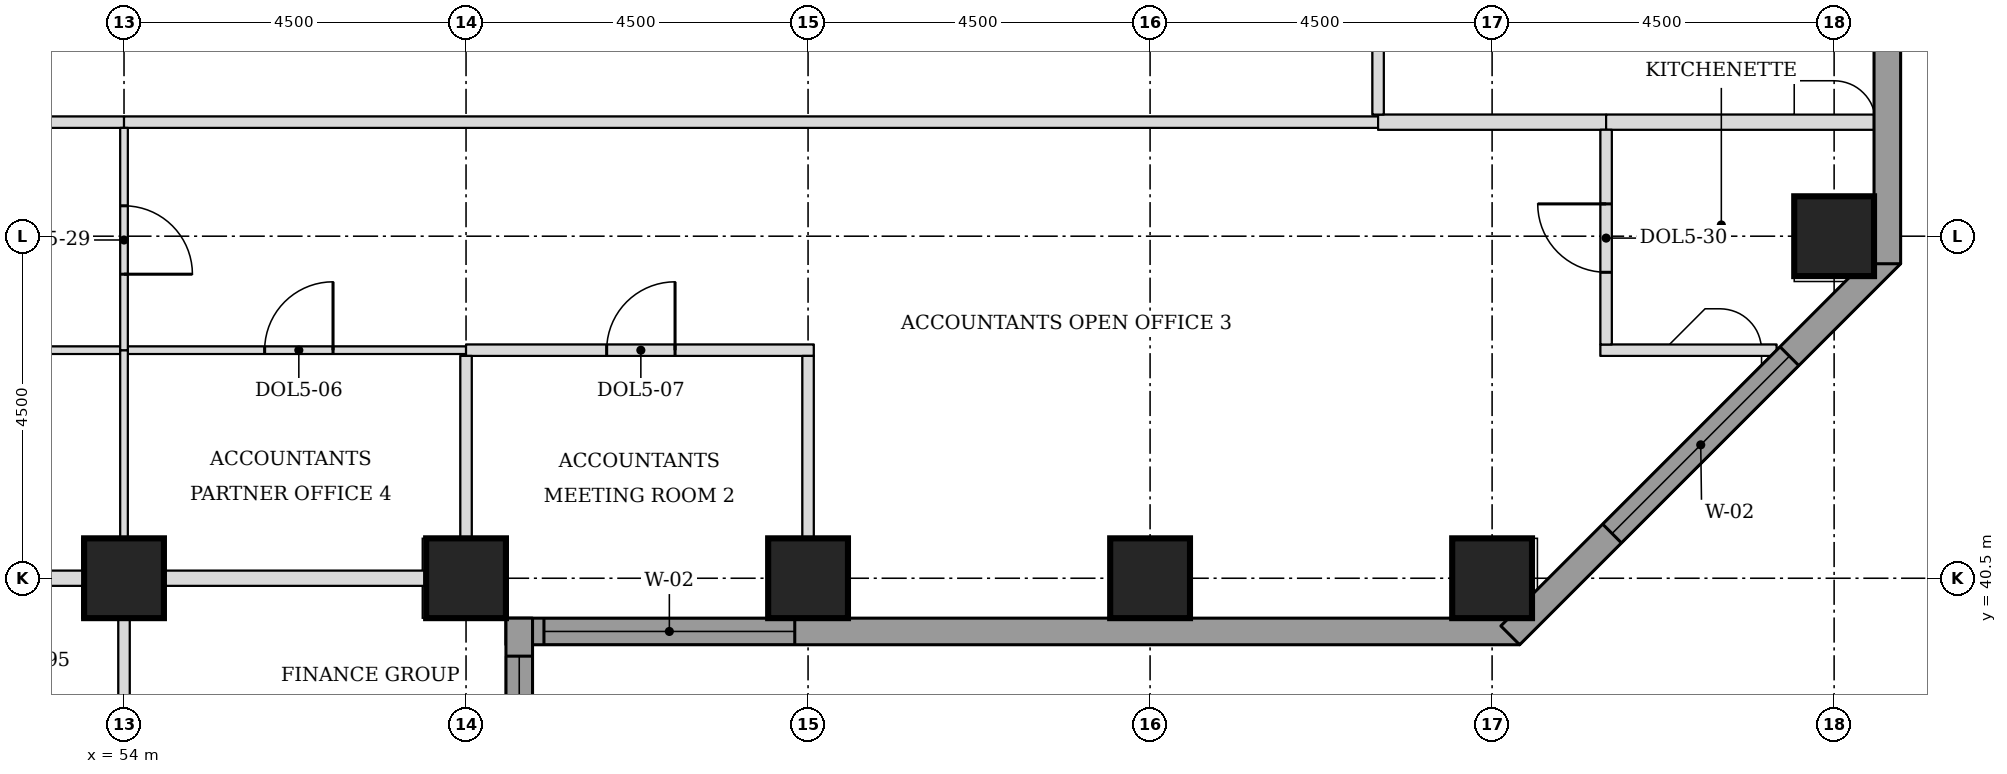
"""IFC4 building model, lengths in metres.
Left out: names, types, materials, properties, quantities, classifications, styles, units other than length and angle.
Written with IfcOpenShell. Run it as: python <this file> out.ifc"""

import sys

from ifc_helpers import new_model, si_unit, direction, frame, frame_2d, origin, origin_2d, place, context, subcontext, project, spatial, rectangle, extrude, element, fill, save


model = new_model("IFC4")
c1 = context("Model", 3, precision=1e-05, world=origin(), true_north=direction((0.0, 1.0)))
c2 = subcontext(c1, "Body", "Model", "MODEL_VIEW")
j1 = project(units=[si_unit("LENGTHUNIT", "METRE"), si_unit("PLANEANGLEUNIT", "RADIAN")], contexts=[c1])
p1 = place(None, origin())
s1 = spatial("IfcSite", under=j1, at=p1, CompositionType="ELEMENT")
p2 = place(p1, origin())
s2 = spatial("IfcBuilding", under=s1, at=p2, CompositionType="ELEMENT")
p3 = place(p2, frame((0.0, 0.0, 112.2)))
s3 = spatial("IfcBuildingStorey", under=s2, at=p3, CompositionType="ELEMENT", Elevation=112.2)
for number, where, z_axis, x_axis in (
    (1, (54.0, 40.5, 0.0), (0.0, 0.0, 1.0), (1.0, 0.0, 0.0)),
    (2, (58.5, 40.5, 0.0), (0.0, 0.0, 1.0), (1.0, 0.0, 0.0)),
    (3, (63.0, 40.5, 0.0), (0.0, 0.0, 1.0), (1.0, 0.0, 0.0)),
    (4, (67.5, 40.5, 0.0), (0.0, 0.0, 1.0), (1.0, 0.0, 0.0)),
    (5, (72.0, 40.5, 0.0), (0.0, 0.0, 1.0), (1.0, 0.0, 0.0)),
    (6, (76.5, 45.0, 0.0), (0.0, 0.0, 1.0), (1.0, 0.0, 0.0)),
):
    element("IfcColumn", number, at=place(p3, frame(where, z_axis=z_axis, x_axis=x_axis)), inside=s3, PredefinedType="COLUMN", context=c2, shape_type="SweptSolid", body=[
        extrude(rectangle(XDim=1.05, YDim=1.05, at=origin_2d()), origin(), (0.0, 0.0, 1.0), 3.7),
    ])
p4 = place(p3, frame((59.025, 39.8, 0.0), z_axis=(0.0, 0.0, 1.0), x_axis=(1.0, 0.0, 0.0)))
e7 = element("IfcWall", 7, at=p4, inside=s3, PredefinedType="STANDARD", context=c2, shape_type="SweptSolid", body=[
    extrude(rectangle(XDim=13.337, YDim=0.35, at=frame_2d((6.669, 0.0))), origin(), (0.0, 0.0, 1.0), 3.525),
])
p5 = place(p4, frame((0.5, 0.0, 0.9)))
e8 = element("IfcOpeningElement", 8, at=p5, cuts=e7, PredefinedType="OPENING", context=c2, shape_type="SweptSolid", body=[
    extrude(rectangle(XDim=3.3, YDim=1.9, at=frame_2d((1.65, 0.95))), frame((0.0, 0.185, 0.0), z_axis=(0.0, -1.0, 0.0), x_axis=(1.0, 0.0, 0.0)), (0.0, 0.0, 1.0), 0.37),
])
p6 = place(p3, frame((72.239, 39.749, 0.0), z_axis=(0.0, 0.0, 1.0), x_axis=(0.707106781187, 0.707106781187, 0.0)))
e9 = element("IfcWall", 9, at=p6, inside=s3, PredefinedType="STANDARD", context=c2, shape_type="SweptSolid", body=[
    extrude(rectangle(XDim=7.089, YDim=0.35, at=frame_2d((3.544, 0.0))), origin(), (0.0, 0.0, 1.0), 3.525),
])
p7 = place(p6, frame((1.894, 0.0, 0.9)))
e10 = element("IfcOpeningElement", 10, at=p7, cuts=e9, PredefinedType="OPENING", context=c2, shape_type="SweptSolid", body=[
    extrude(rectangle(XDim=3.3, YDim=1.9, at=frame_2d((1.65, 0.95))), frame((0.0, 0.185, 0.0), z_axis=(0.0, -1.0, 0.0), x_axis=(1.0, 0.0, 0.0)), (0.0, 0.0, 1.0), 0.37),
])
p8 = place(p3, frame((77.2, 44.638, 0.0), z_axis=(0.0, 0.0, 1.0), x_axis=(0.0, 1.0, 0.0)))
e11 = element("IfcWall", 11, at=p8, inside=s3, PredefinedType="STANDARD", context=c2, shape_type="SweptSolid", body=[
    extrude(rectangle(XDim=32.225, YDim=0.35, at=frame_2d((16.112, 0.0))), origin(), (0.0, 0.0, 1.0), 3.525),
])
p9 = place(p8, frame((5.462, 0.0, 0.9)))
e12 = element("IfcOpeningElement", 12, at=p9, cuts=e11, PredefinedType="OPENING", context=c2, shape_type="SweptSolid", body=[
    extrude(rectangle(XDim=3.3, YDim=1.9, at=frame_2d((1.65, 0.95))), frame((0.0, 0.185, 0.0), z_axis=(0.0, -1.0, 0.0), x_axis=(1.0, 0.0, 0.0)), (0.0, 0.0, 1.0), 0.37),
])
p10 = place(p8, frame((9.962, 0.0, 0.9)))
e13 = element("IfcOpeningElement", 13, at=p10, cuts=e11, PredefinedType="OPENING", context=c2, shape_type="SweptSolid", body=[
    extrude(rectangle(XDim=3.3, YDim=1.9, at=frame_2d((1.65, 0.95))), frame((0.0, 0.185, 0.0), z_axis=(0.0, -1.0, 0.0), x_axis=(1.0, 0.0, 0.0)), (0.0, 0.0, 1.0), 0.37),
])
p11 = place(p8, frame((14.462, 0.0, 0.9)))
e14 = element("IfcOpeningElement", 14, at=p11, cuts=e11, PredefinedType="OPENING", context=c2, shape_type="SweptSolid", body=[
    extrude(rectangle(XDim=3.3, YDim=1.9, at=frame_2d((1.65, 0.95))), frame((0.0, 0.185, 0.0), z_axis=(0.0, -1.0, 0.0), x_axis=(1.0, 0.0, 0.0)), (0.0, 0.0, 1.0), 0.37),
])
p12 = place(p8, frame((18.962, 0.0, 0.9)))
e15 = element("IfcOpeningElement", 15, at=p12, cuts=e11, PredefinedType="OPENING", context=c2, shape_type="SweptSolid", body=[
    extrude(rectangle(XDim=3.3, YDim=1.9, at=frame_2d((1.65, 0.95))), frame((0.0, 0.185, 0.0), z_axis=(0.0, -1.0, 0.0), x_axis=(1.0, 0.0, 0.0)), (0.0, 0.0, 1.0), 0.37),
])
p13 = place(p8, frame((23.462, 0.0, 0.9)))
e16 = element("IfcOpeningElement", 16, at=p13, cuts=e11, PredefinedType="OPENING", context=c2, shape_type="SweptSolid", body=[
    extrude(rectangle(XDim=3.3, YDim=1.9, at=frame_2d((1.65, 0.95))), frame((0.0, 0.185, 0.0), z_axis=(0.0, -1.0, 0.0), x_axis=(1.0, 0.0, 0.0)), (0.0, 0.0, 1.0), 0.37),
])
p14 = place(p3, frame((59.2, 22.138, 0.0), z_axis=(0.0, 0.0, 1.0), x_axis=(0.0, 1.0, 0.0)))
e17 = element("IfcWall", 17, at=p14, inside=s3, PredefinedType="STANDARD", context=c2, shape_type="SweptSolid", body=[
    extrude(rectangle(XDim=17.837, YDim=0.35, at=frame_2d((8.919, 0.0))), origin(), (0.0, 0.0, 1.0), 3.525),
])
p15 = place(p14, frame((5.462, 0.0, 0.9)))
e18 = element("IfcOpeningElement", 18, at=p15, cuts=e17, PredefinedType="OPENING", context=c2, shape_type="SweptSolid", body=[
    extrude(rectangle(XDim=3.3, YDim=1.9, at=frame_2d((1.65, 0.95))), frame((0.0, 0.185, 0.0), z_axis=(0.0, -1.0, 0.0), x_axis=(1.0, 0.0, 0.0)), (0.0, 0.0, 1.0), 0.37),
])
p16 = place(p14, frame((14.037, 0.0, 0.9)))
e19 = element("IfcOpeningElement", 19, at=p16, cuts=e17, PredefinedType="OPENING", context=c2, shape_type="SweptSolid", body=[
    extrude(rectangle(XDim=3.3, YDim=1.9, at=frame_2d((1.65, 0.95))), frame((0.0, 0.185, 0.0), z_axis=(0.0, -1.0, 0.0), x_axis=(1.0, 0.0, 0.0)), (0.0, 0.0, 1.0), 0.37),
])
p17 = place(p3, frame((50.015, 40.5, 0.0), z_axis=(0.0, 0.0, 1.0), x_axis=(1.0, 0.0, 0.0)))
e20 = element("IfcWall", 20, at=p17, inside=s3, PredefinedType="PARTITIONING", context=c2, shape_type="SweptSolid", body=[
    extrude(rectangle(XDim=3.46, YDim=0.2, at=frame_2d((1.73, 0.0))), origin(), (0.0, 0.0, 1.0), 2.8),
])
p18 = place(p3, frame((54.495, 40.5, 0.0), z_axis=(0.0, 0.0, 1.0), x_axis=(1.0, 0.0, 0.0)))
e21 = element("IfcWall", 21, at=p18, inside=s3, PredefinedType="PARTITIONING", context=c2, shape_type="SweptSolid", body=[
    extrude(rectangle(XDim=3.48, YDim=0.2, at=frame_2d((1.74, 0.0))), origin(), (0.0, 0.0, 1.0), 2.8),
])
p19 = place(p3, frame((49.575, 43.5, 0.0), z_axis=(0.0, 0.0, 1.0), x_axis=(1.0, 0.0, 0.0)))
e22 = element("IfcWall", 22, at=p19, inside=s3, PredefinedType="PARTITIONING", context=c2, shape_type="SweptSolid", body=[
    extrude(rectangle(XDim=4.375, YDim=0.1, at=frame_2d((2.188, 0.0))), origin(), (0.0, 0.0, 1.0), 3.55),
])
p20 = place(p19, frame((1.75, 0.0, 0.0)))
e23 = element("IfcOpeningElement", 23, at=p20, cuts=e22, PredefinedType="OPENING", context=c2, shape_type="SweptSolid", body=[
    extrude(rectangle(XDim=0.9, YDim=2.1, at=frame_2d((0.45, 1.05))), frame((0.0, 0.06, 0.0), z_axis=(0.0, -1.0, 0.0), x_axis=(1.0, 0.0, 0.0)), (0.0, 0.0, 1.0), 0.12),
])
p21 = place(p3, frame((54.05, 43.5, 0.0), z_axis=(0.0, 0.0, 1.0), x_axis=(1.0, 0.0, 0.0)))
e24 = element("IfcWall", 24, at=p21, inside=s3, PredefinedType="PARTITIONING", context=c2, shape_type="SweptSolid", body=[
    extrude(rectangle(XDim=4.45, YDim=0.1, at=frame_2d((2.225, 0.0))), origin(), (0.0, 0.0, 1.0), 3.55),
])
p22 = place(p21, frame((1.8, 0.0, 0.0)))
e25 = element("IfcOpeningElement", 25, at=p22, cuts=e24, PredefinedType="OPENING", context=c2, shape_type="SweptSolid", body=[
    extrude(rectangle(XDim=0.9, YDim=2.1, at=frame_2d((0.45, 1.05))), frame((0.0, 0.06, 0.0), z_axis=(0.0, -1.0, 0.0), x_axis=(1.0, 0.0, 0.0)), (0.0, 0.0, 1.0), 0.12),
])
p23 = place(p3, frame((58.5, 43.5, 0.0), z_axis=(0.0, 0.0, 1.0), x_axis=(1.0, 0.0, 0.0)))
e26 = element("IfcWall", 26, at=p23, inside=s3, PredefinedType="PARTITIONING", context=c2, shape_type="SweptSolid", body=[
    extrude(rectangle(XDim=4.575, YDim=0.15, at=frame_2d((2.288, 0.0))), origin(), (0.0, 0.0, 1.0), 3.55),
])
p24 = place(p23, frame((1.85, 0.0, 0.0)))
e27 = element("IfcOpeningElement", 27, at=p24, cuts=e26, PredefinedType="OPENING", context=c2, shape_type="SweptSolid", body=[
    extrude(rectangle(XDim=0.9, YDim=2.1, at=frame_2d((0.45, 1.05))), frame((0.0, 0.085, 0.0), z_axis=(0.0, -1.0, 0.0), x_axis=(1.0, 0.0, 0.0)), (0.0, 0.0, 1.0), 0.17),
])
p25 = place(p3, frame((73.425, 43.5, 0.0), z_axis=(0.0, 0.0, 1.0), x_axis=(1.0, 0.0, 0.0)))
e28 = element("IfcWall", 28, at=p25, inside=s3, PredefinedType="PARTITIONING", context=c2, shape_type="SweptSolid", body=[
    extrude(rectangle(XDim=2.317, YDim=0.15, at=frame_2d((1.159, 0.0))), origin(), (0.0, 0.0, 1.0), 3.55),
])
p26 = place(p3, frame((49.425, 46.5, 0.0), z_axis=(0.0, 0.0, 1.0), x_axis=(1.0, 0.0, 0.0)))
e29 = element("IfcWall", 29, at=p26, inside=s3, PredefinedType="PARTITIONING", context=c2, shape_type="SweptSolid", body=[
    extrude(rectangle(XDim=4.575, YDim=0.15, at=frame_2d((2.288, 0.0))), origin(), (0.0, 0.0, 1.0), 3.55),
])
p27 = place(p26, frame((1.8, 0.0, 0.0)))
e30 = element("IfcOpeningElement", 30, at=p27, cuts=e29, PredefinedType="OPENING", context=c2, shape_type="SweptSolid", body=[
    extrude(rectangle(XDim=1.0, YDim=2.1, at=frame_2d((0.5, 1.05))), frame((0.0, 0.085, 0.0), z_axis=(0.0, -1.0, 0.0), x_axis=(1.0, 0.0, 0.0)), (0.0, 0.0, 1.0), 0.17),
])
p28 = place(p3, frame((54.0, 46.5, 0.0), z_axis=(0.0, 0.0, 1.0), x_axis=(1.0, 0.0, 0.0)))
e31 = element("IfcWall", 31, at=p28, inside=s3, PredefinedType="PARTITIONING", context=c2, shape_type="SweptSolid", body=[
    extrude(rectangle(XDim=16.5, YDim=0.15, at=frame_2d((8.25, 0.0))), origin(), (0.0, 0.0, 1.0), 3.55),
])
p29 = place(p3, frame((70.5, 46.5, 0.0), z_axis=(0.0, 0.0, 1.0), x_axis=(1.0, 0.0, 0.0)))
e32 = element("IfcWall", 32, at=p29, inside=s3, PredefinedType="PARTITIONING", context=c2, shape_type="SweptSolid", body=[
    extrude(rectangle(XDim=3.0, YDim=0.2, at=frame_2d((1.5, 0.0))), origin(), (0.0, 0.0, 1.0), 3.55),
])
p30 = place(p3, frame((73.5, 46.5, 0.0), z_axis=(0.0, 0.0, 1.0), x_axis=(1.0, 0.0, 0.0)))
e33 = element("IfcWall", 33, at=p30, inside=s3, PredefinedType="PARTITIONING", context=c2, shape_type="SweptSolid", body=[
    extrude(rectangle(XDim=3.525, YDim=0.2, at=frame_2d((1.762, 0.0))), origin(), (0.0, 0.0, 1.0), 3.55),
])
p31 = place(p3, frame((54.0, 36.0, 0.0), z_axis=(0.0, 0.0, 1.0), x_axis=(0.0, 1.0, 0.0)))
e34 = element("IfcWall", 34, at=p31, inside=s3, PredefinedType="PARTITIONING", context=c2, shape_type="SweptSolid", body=[
    extrude(rectangle(XDim=3.975, YDim=0.15, at=frame_2d((1.988, 0.0))), origin(), (0.0, 0.0, 1.0), 3.55),
])
p32 = place(p31, frame((1.55, 0.0, 0.0)))
e35 = element("IfcOpeningElement", 35, at=p32, cuts=e34, PredefinedType="OPENING", context=c2, shape_type="SweptSolid", body=[
    extrude(rectangle(XDim=0.9, YDim=2.1, at=frame_2d((0.45, 1.05))), frame((0.0, 0.085, 0.0), z_axis=(0.0, -1.0, 0.0), x_axis=(1.0, 0.0, 0.0)), (0.0, 0.0, 1.0), 0.17),
])
p33 = place(p3, frame((63.0, 39.975, 0.0), z_axis=(0.0, 0.0, 1.0), x_axis=(0.0, 1.0, 0.0)))
e36 = element("IfcWall", 36, at=p33, inside=s3, PredefinedType="PARTITIONING", context=c2, shape_type="SweptSolid", body=[
    extrude(rectangle(XDim=3.45, YDim=0.15, at=frame_2d((1.725, 0.0))), origin(), (0.0, 0.0, 1.0), 3.55),
])
p34 = place(p3, frame((54.0, 41.025, 0.0), z_axis=(0.0, 0.0, 1.0), x_axis=(0.0, 1.0, 0.0)))
e37 = element("IfcWall", 37, at=p34, inside=s3, PredefinedType="PARTITIONING", context=c2, shape_type="SweptSolid", body=[
    extrude(rectangle(XDim=2.475, YDim=0.1, at=frame_2d((1.238, 0.0))), origin(), (0.0, 0.0, 1.0), 3.55),
])
p35 = place(p3, frame((58.5, 41.025, 0.0), z_axis=(0.0, 0.0, 1.0), x_axis=(0.0, 1.0, 0.0)))
e38 = element("IfcWall", 38, at=p35, inside=s3, PredefinedType="PARTITIONING", context=c2, shape_type="SweptSolid", body=[
    extrude(rectangle(XDim=2.4, YDim=0.15, at=frame_2d((1.2, 0.0))), origin(), (0.0, 0.0, 1.0), 3.55),
])
p36 = place(p3, frame((54.0, 43.5, 0.0), z_axis=(0.0, 0.0, 1.0), x_axis=(0.0, 1.0, 0.0)))
e39 = element("IfcWall", 39, at=p36, inside=s3, PredefinedType="PARTITIONING", context=c2, shape_type="SweptSolid", body=[
    extrude(rectangle(XDim=2.925, YDim=0.1, at=frame_2d((1.462, 0.0))), origin(), (0.0, 0.0, 1.0), 3.55),
])
p37 = place(p36, frame((1.0, 0.0, 0.0)))
e40 = element("IfcOpeningElement", 40, at=p37, cuts=e39, PredefinedType="OPENING", context=c2, shape_type="SweptSolid", body=[
    extrude(rectangle(XDim=0.9, YDim=2.1, at=frame_2d((0.45, 1.05))), frame((0.0, 0.06, 0.0), z_axis=(0.0, -1.0, 0.0), x_axis=(1.0, 0.0, 0.0)), (0.0, 0.0, 1.0), 0.12),
])
p38 = place(p3, frame((73.5, 43.575, 0.0), z_axis=(0.0, 0.0, 1.0), x_axis=(0.0, 1.0, 0.0)))
e41 = element("IfcWall", 41, at=p38, inside=s3, PredefinedType="PARTITIONING", context=c2, shape_type="SweptSolid", body=[
    extrude(rectangle(XDim=2.825, YDim=0.15, at=frame_2d((1.413, 0.0))), origin(), (0.0, 0.0, 1.0), 3.55),
])
p39 = place(p38, frame((0.95, 0.0, 0.0)))
e42 = element("IfcOpeningElement", 42, at=p39, cuts=e41, PredefinedType="OPENING", context=c2, shape_type="SweptSolid", body=[
    extrude(rectangle(XDim=0.9, YDim=2.1, at=frame_2d((0.45, 1.05))), frame((0.0, 0.085, 0.0), z_axis=(0.0, -1.0, 0.0), x_axis=(1.0, 0.0, 0.0)), (0.0, 0.0, 1.0), 0.17),
])
p40 = place(p3, frame((70.5, 46.6, 0.0), z_axis=(0.0, 0.0, 1.0), x_axis=(0.0, 1.0, 0.0)))
e43 = element("IfcWall", 43, at=p40, inside=s3, PredefinedType="PARTITIONING", context=c2, shape_type="SweptSolid", body=[
    extrude(rectangle(XDim=4.4, YDim=0.15, at=frame_2d((2.2, 0.0))), origin(), (0.0, 0.0, 1.0), 3.55),
])
p41 = place(p40, frame((1.7, 0.0, 0.0)))
e44 = element("IfcOpeningElement", 44, at=p41, cuts=e43, PredefinedType="OPENING", context=c2, shape_type="SweptSolid", body=[
    extrude(rectangle(XDim=1.0, YDim=2.1, at=frame_2d((0.5, 1.05))), frame((0.0, 0.085, 0.0), z_axis=(0.0, -1.0, 0.0), x_axis=(1.0, 0.0, 0.0)), (0.0, 0.0, 1.0), 0.17),
])
p42 = place(p5, origin())
e45 = element("IfcWindow", 45, at=p42, inside=s3, PartitioningType="SINGLE_PANEL", PredefinedType="WINDOW", context=c2, shape_type="SweptSolid", body=[
    extrude(rectangle(XDim=3.3, YDim=1.9, at=frame_2d((1.65, 0.95))), frame((0.0, 0.085, 0.0), z_axis=(0.0, -1.0, 0.0), x_axis=(1.0, 0.0, 0.0)), (0.0, 0.0, 1.0), 0.06),
])
fill(e8, e45)
p43 = place(p7, origin())
e46 = element("IfcWindow", 46, at=p43, inside=s3, PartitioningType="SINGLE_PANEL", PredefinedType="WINDOW", context=c2, shape_type="SweptSolid", body=[
    extrude(rectangle(XDim=3.3, YDim=1.9, at=frame_2d((1.65, 0.95))), frame((0.0, 0.085, 0.0), z_axis=(0.0, -1.0, 0.0), x_axis=(1.0, 0.0, 0.0)), (0.0, 0.0, 1.0), 0.06),
])
fill(e10, e46)
p44 = place(p16, origin())
e47 = element("IfcWindow", 47, at=p44, inside=s3, PartitioningType="SINGLE_PANEL", PredefinedType="WINDOW", context=c2, shape_type="SweptSolid", body=[
    extrude(rectangle(XDim=3.3, YDim=1.9, at=frame_2d((1.65, 0.95))), frame((0.0, 0.085, 0.0), z_axis=(0.0, -1.0, 0.0), x_axis=(1.0, 0.0, 0.0)), (0.0, 0.0, 1.0), 0.06),
])
fill(e19, e47)
p45 = place(p37, frame((0.9, 0.0, 0.0), z_axis=(0.0, 0.0, 1.0), x_axis=(-1.0, 0.0, 0.0)))
e48 = element("IfcDoor", 48, at=p45, inside=s3, OperationType="SINGLE_SWING_RIGHT", PredefinedType="DOOR", context=c2, shape_type="SweptSolid", body=[
    extrude(rectangle(XDim=0.9, YDim=2.1, at=frame_2d((0.45, 1.05))), frame((0.0, 0.025, 0.0), z_axis=(0.0, -1.0, 0.0), x_axis=(1.0, 0.0, 0.0)), (0.0, 0.0, 1.0), 0.05),
])
fill(e40, e48)
p46 = place(p22, origin())
e49 = element("IfcDoor", 49, at=p46, inside=s3, OperationType="SINGLE_SWING_RIGHT", PredefinedType="DOOR", context=c2, shape_type="SweptSolid", body=[
    extrude(rectangle(XDim=0.9, YDim=2.1, at=frame_2d((0.45, 1.05))), frame((0.0, 0.025, 0.0), z_axis=(0.0, -1.0, 0.0), x_axis=(1.0, 0.0, 0.0)), (0.0, 0.0, 1.0), 0.05),
])
fill(e25, e49)
p47 = place(p39, origin())
e50 = element("IfcDoor", 50, at=p47, inside=s3, OperationType="SINGLE_SWING_RIGHT", PredefinedType="DOOR", context=c2, shape_type="SweptSolid", body=[
    extrude(rectangle(XDim=0.9, YDim=2.1, at=frame_2d((0.45, 1.05))), frame((0.0, 0.025, 0.0), z_axis=(0.0, -1.0, 0.0), x_axis=(1.0, 0.0, 0.0)), (0.0, 0.0, 1.0), 0.05),
])
fill(e42, e50)
p48 = place(p24, origin())
e51 = element("IfcDoor", 51, at=p48, inside=s3, OperationType="SINGLE_SWING_RIGHT", PredefinedType="DOOR", context=c2, shape_type="SweptSolid", body=[
    extrude(rectangle(XDim=0.9, YDim=2.1, at=frame_2d((0.45, 1.05))), frame((0.0, 0.025, 0.0), z_axis=(0.0, -1.0, 0.0), x_axis=(1.0, 0.0, 0.0)), (0.0, 0.0, 1.0), 0.05),
])
fill(e27, e51)
save(model, sys.argv[1])
